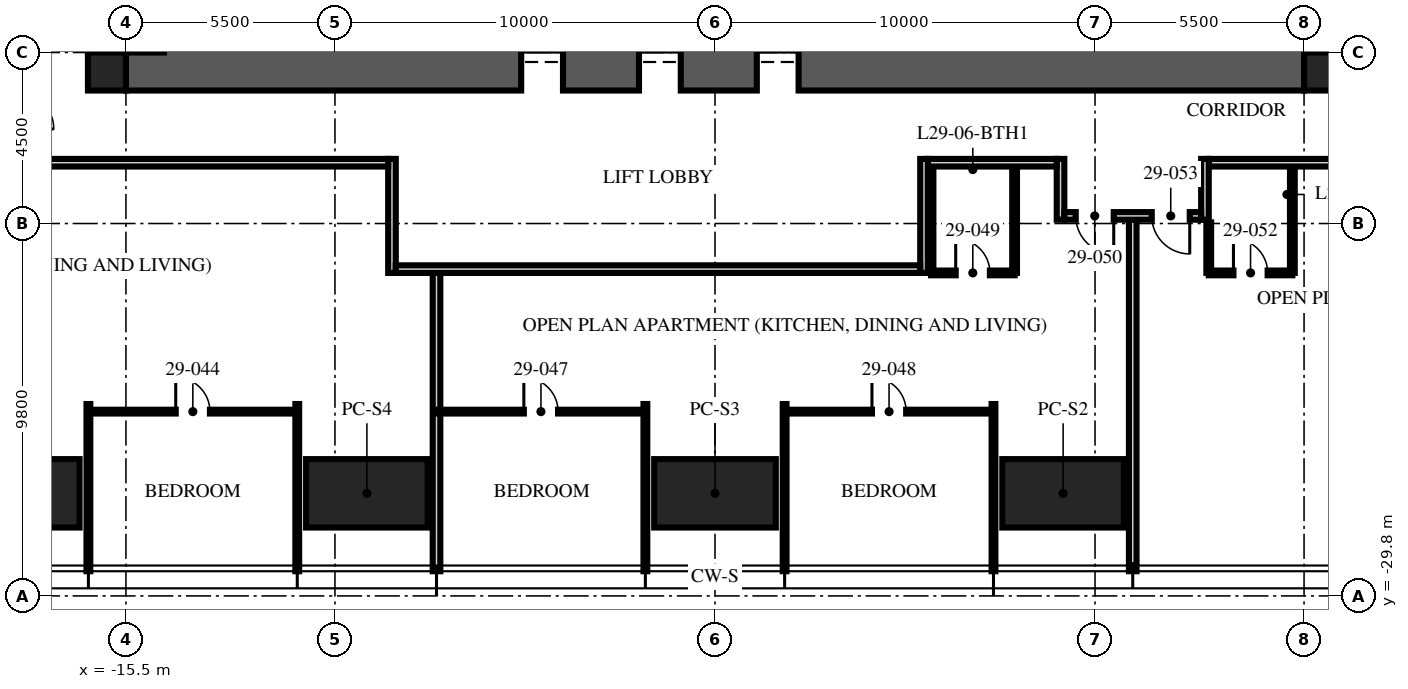
"""IFC4 building model, lengths in metres.
Left out: names, types, materials, properties, quantities, classifications, styles, units other than length and angle.
Written with IfcOpenShell. Run it as: python <this file> out.ifc"""

import sys

from ifc_helpers import new_model, si_unit, direction, frame, frame_2d, origin, origin_2d, place, context, subcontext, project, spatial, rectangle, hollow_rectangle, extrude, element, fill, save


model = new_model("IFC4")
c1 = context("Model", 3, precision=1e-05, world=origin(), true_north=direction((0.0, 1.0)))
c2 = subcontext(c1, "Body", "Model", "MODEL_VIEW")
j1 = project(units=[si_unit("LENGTHUNIT", "METRE"), si_unit("PLANEANGLEUNIT", "RADIAN")], contexts=[c1])
p1 = place(None, origin())
s1 = spatial("IfcSite", under=j1, at=p1, CompositionType="ELEMENT")
p2 = place(p1, origin())
s2 = spatial("IfcBuilding", under=s1, at=p2, CompositionType="ELEMENT")
p3 = place(p2, frame((0.0, 0.0, 118.5)))
s3 = spatial("IfcBuildingStorey", under=s2, at=p3, CompositionType="ELEMENT", Elevation=118.5)
p4 = place(p3, frame((-15.5, -15.5, -0.25), z_axis=(0.0, 0.0, 1.0), x_axis=(1.0, 0.0, 0.0)))
e1 = element("IfcWall", 1, at=p4, inside=s3, PredefinedType="SHEAR", context=c2, shape_type="SweptSolid", body=[
    extrude(rectangle(XDim=31.0, YDim=2.0, at=frame_2d((15.5, 0.0))), origin(), (0.0, 0.0, 1.0), 3.75),
])
p5 = place(p4, frame((10.4, 0.0, 0.25)))
e2 = element("IfcOpeningElement", 2, at=p5, cuts=e1, PredefinedType="OPENING", context=c2, shape_type="SweptSolid", body=[
    extrude(rectangle(XDim=1.1, YDim=2.1, at=frame_2d((0.55, 1.05))), frame((0.0, 1.01, 0.0), z_axis=(0.0, -1.0, 0.0), x_axis=(1.0, 0.0, 0.0)), (0.0, 0.0, 1.0), 2.02),
])
p6 = place(p4, frame((13.5, 0.0, 0.25)))
e3 = element("IfcOpeningElement", 3, at=p6, cuts=e1, PredefinedType="OPENING", context=c2, shape_type="SweptSolid", body=[
    extrude(rectangle(XDim=1.1, YDim=2.1, at=frame_2d((0.55, 1.05))), frame((0.0, 1.01, 0.0), z_axis=(0.0, -1.0, 0.0), x_axis=(1.0, 0.0, 0.0)), (0.0, 0.0, 1.0), 2.02),
])
p7 = place(p4, frame((16.6, 0.0, 0.25)))
e4 = element("IfcOpeningElement", 4, at=p7, cuts=e1, PredefinedType="OPENING", context=c2, shape_type="SweptSolid", body=[
    extrude(rectangle(XDim=1.1, YDim=2.1, at=frame_2d((0.55, 1.05))), frame((0.0, 1.01, 0.0), z_axis=(0.0, -1.0, 0.0), x_axis=(1.0, 0.0, 0.0)), (0.0, 0.0, 1.0), 2.02),
])
for number, where, z_axis, x_axis in (
    (5, (-16.0, -16.0, -0.25), (0.0, 0.0, 1.0), (1.0, 0.0, 0.0)),
    (6, (16.0, -16.0, -0.25), (0.0, 0.0, 1.0), (1.0, 0.0, 0.0)),
):
    element("IfcColumn", number, at=place(p3, frame(where, z_axis=z_axis, x_axis=x_axis)), inside=s3, PredefinedType="COLUMN", context=c2, shape_type="SweptSolid", body=[
        extrude(rectangle(XDim=1.0, YDim=1.0, at=origin_2d()), origin(), (0.0, 0.0, 1.0), 3.75),
    ])
for number, where, z_axis, x_axis in (
    (7, (9.16, -27.1, 0.0), (0.0, 0.0, 1.0), (1.0, 0.0, 0.0)),
    (8, (0.0, -27.1, 0.0), (0.0, 0.0, 1.0), (1.0, 0.0, 0.0)),
    (9, (-9.16, -27.1, 0.0), (0.0, 0.0, 1.0), (1.0, 0.0, 0.0)),
    (10, (-18.32, -27.1, 0.0), (0.0, 0.0, 1.0), (1.0, 0.0, 0.0)),
):
    element("IfcColumn", number, at=place(p3, frame(where, z_axis=z_axis, x_axis=x_axis)), inside=s3, PredefinedType="COLUMN", context=c2, shape_type="SweptSolid", body=[
        extrude(hollow_rectangle(XDim=3.2, YDim=1.8, WallThickness=0.2, at=origin_2d()), origin(), (0.0, 0.0, 1.0), 3.75),
    ])
for number, where, z_axis, x_axis in (
    (11, (-16.488, -24.75, 0.0), (0.0, 0.0, 1.0), (0.0, -1.0, 0.0)),
    (12, (-10.992, -24.75, 0.0), (0.0, 0.0, 1.0), (0.0, -1.0, 0.0)),
):
    element("IfcWall", number, at=place(p3, frame(where, z_axis=z_axis, x_axis=x_axis)), inside=s3, PredefinedType="PARTITIONING", context=c2, shape_type="SweptSolid", body=[
        extrude(rectangle(XDim=4.4, YDim=0.1, at=frame_2d((2.2, 0.0))), origin(), (0.0, 0.0, 1.0), 2.81),
    ])
p8 = place(p3, frame((-7.328, -21.3, 0.0), z_axis=(0.0, 0.0, 1.0), x_axis=(0.0, -1.0, 0.0)))
e13 = element("IfcWall", 13, at=p8, inside=s3, PredefinedType="PARTITIONING", context=c2, shape_type="SweptSolid", body=[
    extrude(rectangle(XDim=7.85, YDim=0.2, at=frame_2d((3.925, 0.0))), origin(), (0.0, 0.0, 1.0), 2.81),
])
for number, where, z_axis, x_axis in (
    (14, (-1.832, -24.75, 0.0), (0.0, 0.0, 1.0), (0.0, -1.0, 0.0)),
    (15, (1.832, -24.75, 0.0), (0.0, 0.0, 1.0), (0.0, -1.0, 0.0)),
    (16, (7.328, -24.75, 0.0), (0.0, 0.0, 1.0), (0.0, -1.0, 0.0)),
):
    element("IfcWall", number, at=place(p3, frame(where, z_axis=z_axis, x_axis=x_axis)), inside=s3, PredefinedType="PARTITIONING", context=c2, shape_type="SweptSolid", body=[
        extrude(rectangle(XDim=4.4, YDim=0.1, at=frame_2d((2.2, 0.0))), origin(), (0.0, 0.0, 1.0), 2.81),
    ])
p9 = place(p3, frame((10.992, -19.9, 0.0), z_axis=(0.0, 0.0, 1.0), x_axis=(0.0, -1.0, 0.0)))
e17 = element("IfcWall", 17, at=p9, inside=s3, PredefinedType="PARTITIONING", context=c2, shape_type="SweptSolid", body=[
    extrude(rectangle(XDim=9.25, YDim=0.2, at=frame_2d((4.625, 0.0))), origin(), (0.0, 0.0, 1.0), 2.81),
])
p10 = place(p3, frame((-16.488, -24.95, 0.0), z_axis=(0.0, 0.0, 1.0), x_axis=(1.0, 0.0, 0.0)))
e18 = element("IfcWall", 18, at=p10, inside=s3, PredefinedType="PARTITIONING", context=c2, shape_type="SweptSolid", body=[
    extrude(rectangle(XDim=5.496, YDim=0.1, at=frame_2d((2.748, 0.0))), origin(), (0.0, 0.0, 1.0), 2.81),
])
p11 = place(p10, frame((2.298, 0.0, 0.0)))
e19 = element("IfcOpeningElement", 19, at=p11, cuts=e18, PredefinedType="OPENING", context=c2, shape_type="SweptSolid", body=[
    extrude(rectangle(XDim=0.9, YDim=2.1, at=frame_2d((0.45, 1.05))), frame((0.0, 0.06, 0.0), z_axis=(0.0, -1.0, 0.0), x_axis=(1.0, 0.0, 0.0)), (0.0, 0.0, 1.0), 0.12),
])
p12 = place(p3, frame((-7.328, -24.95, 0.0), z_axis=(0.0, 0.0, 1.0), x_axis=(1.0, 0.0, 0.0)))
e20 = element("IfcWall", 20, at=p12, inside=s3, PredefinedType="PARTITIONING", context=c2, shape_type="SweptSolid", body=[
    extrude(rectangle(XDim=5.496, YDim=0.1, at=frame_2d((2.748, 0.0))), origin(), (0.0, 0.0, 1.0), 2.81),
])
p13 = place(p12, frame((2.298, 0.0, 0.0)))
e21 = element("IfcOpeningElement", 21, at=p13, cuts=e20, PredefinedType="OPENING", context=c2, shape_type="SweptSolid", body=[
    extrude(rectangle(XDim=0.9, YDim=2.1, at=frame_2d((0.45, 1.05))), frame((0.0, 0.06, 0.0), z_axis=(0.0, -1.0, 0.0), x_axis=(1.0, 0.0, 0.0)), (0.0, 0.0, 1.0), 0.12),
])
p14 = place(p3, frame((1.832, -24.95, 0.0), z_axis=(0.0, 0.0, 1.0), x_axis=(1.0, 0.0, 0.0)))
e22 = element("IfcWall", 22, at=p14, inside=s3, PredefinedType="PARTITIONING", context=c2, shape_type="SweptSolid", body=[
    extrude(rectangle(XDim=5.496, YDim=0.1, at=frame_2d((2.748, 0.0))), origin(), (0.0, 0.0, 1.0), 2.81),
])
p15 = place(p14, frame((2.298, 0.0, 0.0)))
e23 = element("IfcOpeningElement", 23, at=p15, cuts=e22, PredefinedType="OPENING", context=c2, shape_type="SweptSolid", body=[
    extrude(rectangle(XDim=0.9, YDim=2.1, at=frame_2d((0.45, 1.05))), frame((0.0, 0.06, 0.0), z_axis=(0.0, -1.0, 0.0), x_axis=(1.0, 0.0, 0.0)), (0.0, 0.0, 1.0), 0.12),
])
p16 = place(p3, frame((5.684, -21.3, 0.0), z_axis=(0.0, 0.0, 1.0), x_axis=(1.0, 0.0, 0.0)))
e24 = element("IfcWall", 24, at=p16, inside=s3, PredefinedType="PARTITIONING", context=c2, shape_type="SweptSolid", body=[
    extrude(rectangle(XDim=2.2, YDim=0.125, at=frame_2d((1.1, 0.0))), origin(), (0.0, 0.0, 1.0), 3.5),
])
p17 = place(p16, frame((0.65, 0.0, 0.0)))
e25 = element("IfcOpeningElement", 25, at=p17, cuts=e24, PredefinedType="OPENING", context=c2, shape_type="SweptSolid", body=[
    extrude(rectangle(XDim=0.9, YDim=2.1, at=frame_2d((0.45, 1.05))), frame((0.0, 0.073, 0.0), z_axis=(0.0, -1.0, 0.0), x_axis=(1.0, 0.0, 0.0)), (0.0, 0.0, 1.0), 0.145),
])
for number, where, z_axis, x_axis in (
    (26, (5.684, -18.5, 0.0), (0.0, 0.0, 1.0), (0.0, -1.0, 0.0)),
    (27, (7.884, -18.5, 0.0), (0.0, 0.0, 1.0), (0.0, -1.0, 0.0)),
):
    element("IfcWall", number, at=place(p3, frame(where, z_axis=z_axis, x_axis=x_axis)), inside=s3, PredefinedType="PARTITIONING", context=c2, shape_type="SweptSolid", body=[
        extrude(rectangle(XDim=2.8, YDim=0.125, at=frame_2d((1.4, 0.0))), origin(), (0.0, 0.0, 1.0), 3.5),
    ])
p18 = place(p3, frame((12.992, -21.3, 0.0), z_axis=(0.0, 0.0, 1.0), x_axis=(1.0, 0.0, 0.0)))
e28 = element("IfcWall", 28, at=p18, inside=s3, PredefinedType="PARTITIONING", context=c2, shape_type="SweptSolid", body=[
    extrude(rectangle(XDim=2.2, YDim=0.125, at=frame_2d((1.1, 0.0))), origin(), (0.0, 0.0, 1.0), 2.81),
])
p19 = place(p18, frame((0.65, 0.0, 0.0)))
e29 = element("IfcOpeningElement", 29, at=p19, cuts=e28, PredefinedType="OPENING", context=c2, shape_type="SweptSolid", body=[
    extrude(rectangle(XDim=0.9, YDim=2.1, at=frame_2d((0.45, 1.05))), frame((0.0, 0.073, 0.0), z_axis=(0.0, -1.0, 0.0), x_axis=(1.0, 0.0, 0.0)), (0.0, 0.0, 1.0), 0.145),
])
p20 = place(p3, frame((12.992, -19.97, 0.0), z_axis=(0.0, 0.0, 1.0), x_axis=(0.0, -1.0, 0.0)))
e30 = element("IfcWall", 30, at=p20, inside=s3, PredefinedType="PARTITIONING", context=c2, shape_type="SweptSolid", body=[
    extrude(rectangle(XDim=1.33, YDim=0.125, at=frame_2d((0.665, 0.0))), origin(), (0.0, 0.0, 1.0), 3.5),
])
p21 = place(p3, frame((15.192, -18.5, 0.0), z_axis=(0.0, 0.0, 1.0), x_axis=(0.0, -1.0, 0.0)))
e31 = element("IfcWall", 31, at=p21, inside=s3, PredefinedType="PARTITIONING", context=c2, shape_type="SweptSolid", body=[
    extrude(rectangle(XDim=2.8, YDim=0.125, at=frame_2d((1.4, 0.0))), origin(), (0.0, 0.0, 1.0), 3.5),
])
p22 = place(p3, frame((18.5, -18.4, 0.0), z_axis=(0.0, 0.0, 1.0), x_axis=(-1.0, 0.0, 0.0)))
e32 = element("IfcWall", 32, at=p22, inside=s3, PredefinedType="PARTITIONING", context=c2, shape_type="SweptSolid", body=[
    extrude(rectangle(XDim=5.508, YDim=0.2, at=frame_2d((2.754, 0.0))), origin(), (0.0, 0.0, 1.0), 2.3),
])
p23 = place(p3, frame((12.892, -18.3, 0.0), z_axis=(0.0, 0.0, 1.0), x_axis=(0.0, -1.0, 0.0)))
e33 = element("IfcWall", 33, at=p23, inside=s3, PredefinedType="PARTITIONING", context=c2, shape_type="SweptSolid", body=[
    extrude(rectangle(XDim=1.6, YDim=0.2, at=frame_2d((0.8, 0.0))), origin(), (0.0, 0.0, 1.0), 3.5),
])
p24 = place(p3, frame((9.092, -18.3, 0.0), z_axis=(0.0, 0.0, 1.0), x_axis=(0.0, -1.0, 0.0)))
e34 = element("IfcWall", 34, at=p24, inside=s3, PredefinedType="PARTITIONING", context=c2, shape_type="SweptSolid", body=[
    extrude(rectangle(XDim=1.6, YDim=0.2, at=frame_2d((0.8, 0.0))), origin(), (0.0, 0.0, 1.0), 2.7),
])
p25 = place(p3, frame((12.792, -19.8, 0.0), z_axis=(0.0, 0.0, 1.0), x_axis=(-1.0, 0.0, 0.0)))
e35 = element("IfcWall", 35, at=p25, inside=s3, PredefinedType="PARTITIONING", context=c2, shape_type="SweptSolid", body=[
    extrude(rectangle(XDim=3.6, YDim=0.2, at=frame_2d((1.8, 0.0))), origin(), (0.0, 0.0, 1.0), 2.7),
])
p26 = place(p25, frame((2.3, 0.0, 0.0)))
e36 = element("IfcOpeningElement", 36, at=p26, cuts=e35, PredefinedType="OPENING", context=c2, shape_type="SweptSolid", body=[
    extrude(rectangle(XDim=1.0, YDim=2.2, at=frame_2d((0.5, 1.1))), frame((0.0, 0.11, 0.0), z_axis=(0.0, -1.0, 0.0), x_axis=(1.0, 0.0, 0.0)), (0.0, 0.0, 1.0), 0.22),
])
p27 = place(p25, frame((0.3, 0.0, 0.0)))
e37 = element("IfcOpeningElement", 37, at=p27, cuts=e35, PredefinedType="OPENING", context=c2, shape_type="SweptSolid", body=[
    extrude(rectangle(XDim=1.0, YDim=2.2, at=frame_2d((0.5, 1.1))), frame((0.0, 0.11, 0.0), z_axis=(0.0, -1.0, 0.0), x_axis=(1.0, 0.0, 0.0)), (0.0, 0.0, 1.0), 0.22),
])
p28 = place(p3, frame((8.992, -18.4, 0.0), z_axis=(0.0, 0.0, 1.0), x_axis=(-1.0, 0.0, 0.0)))
e38 = element("IfcWall", 38, at=p28, inside=s3, PredefinedType="PARTITIONING", context=c2, shape_type="SweptSolid", body=[
    extrude(rectangle(XDim=3.392, YDim=0.2, at=frame_2d((1.696, 0.0))), origin(), (0.0, 0.0, 1.0), 3.5),
])
for number, where, z_axis, x_axis in (
    (39, (5.5, -18.3, 0.0), (0.0, 0.0, 1.0), (0.0, -1.0, 0.0)),
    (40, (-8.5, -18.3, 0.0), (0.0, 0.0, 1.0), (0.0, -1.0, 0.0)),
):
    element("IfcWall", number, at=place(p3, frame(where, z_axis=z_axis, x_axis=x_axis)), inside=s3, PredefinedType="PARTITIONING", context=c2, shape_type="SweptSolid", body=[
        extrude(rectangle(XDim=3.0, YDim=0.2, at=frame_2d((1.5, 0.0))), origin(), (0.0, 0.0, 1.0), 3.5),
    ])
p29 = place(p3, frame((5.4, -21.2, 0.0), z_axis=(0.0, 0.0, 1.0), x_axis=(-1.0, 0.0, 0.0)))
e41 = element("IfcWall", 41, at=p29, inside=s3, PredefinedType="PARTITIONING", context=c2, shape_type="SweptSolid", body=[
    extrude(rectangle(XDim=13.8, YDim=0.2, at=frame_2d((6.9, 0.0))), origin(), (0.0, 0.0, 1.0), 2.7),
])
p30 = place(p3, frame((-8.6, -18.4, 0.0), z_axis=(0.0, 0.0, 1.0), x_axis=(-1.0, 0.0, 0.0)))
e42 = element("IfcWall", 42, at=p30, inside=s3, PredefinedType="PARTITIONING", context=c2, shape_type="SweptSolid", body=[
    extrude(rectangle(XDim=9.9, YDim=0.2, at=frame_2d((4.95, 0.0))), origin(), (0.0, 0.0, 1.0), 2.3),
])
p31 = place(p5, origin())
e43 = element("IfcDoor", 43, at=p31, inside=s3, OperationType="DOUBLE_DOOR_SLIDING", PredefinedType="DOOR", context=c2, shape_type="SweptSolid", body=[
    extrude(rectangle(XDim=1.1, YDim=2.1, at=frame_2d((0.55, 1.05))), frame((0.0, 0.025, 0.0), z_axis=(0.0, -1.0, 0.0), x_axis=(1.0, 0.0, 0.0)), (0.0, 0.0, 1.0), 0.05),
])
fill(e2, e43)
p32 = place(p6, origin())
e44 = element("IfcDoor", 44, at=p32, inside=s3, OperationType="DOUBLE_DOOR_SLIDING", PredefinedType="DOOR", context=c2, shape_type="SweptSolid", body=[
    extrude(rectangle(XDim=1.1, YDim=2.1, at=frame_2d((0.55, 1.05))), frame((0.0, 0.025, 0.0), z_axis=(0.0, -1.0, 0.0), x_axis=(1.0, 0.0, 0.0)), (0.0, 0.0, 1.0), 0.05),
])
fill(e3, e44)
p33 = place(p7, origin())
e45 = element("IfcDoor", 45, at=p33, inside=s3, OperationType="DOUBLE_DOOR_SLIDING", PredefinedType="DOOR", context=c2, shape_type="SweptSolid", body=[
    extrude(rectangle(XDim=1.1, YDim=2.1, at=frame_2d((0.55, 1.05))), frame((0.0, 0.025, 0.0), z_axis=(0.0, -1.0, 0.0), x_axis=(1.0, 0.0, 0.0)), (0.0, 0.0, 1.0), 0.05),
])
fill(e4, e45)
p34 = place(p11, origin())
e46 = element("IfcDoor", 46, at=p34, inside=s3, OperationType="SINGLE_SWING_LEFT", PredefinedType="DOOR", context=c2, shape_type="SweptSolid", body=[
    extrude(rectangle(XDim=0.9, YDim=2.1, at=frame_2d((0.45, 1.05))), frame((0.0, 0.025, 0.0), z_axis=(0.0, -1.0, 0.0), x_axis=(1.0, 0.0, 0.0)), (0.0, 0.0, 1.0), 0.05),
])
fill(e19, e46)
p35 = place(p13, origin())
e47 = element("IfcDoor", 47, at=p35, inside=s3, OperationType="SINGLE_SWING_LEFT", PredefinedType="DOOR", context=c2, shape_type="SweptSolid", body=[
    extrude(rectangle(XDim=0.9, YDim=2.1, at=frame_2d((0.45, 1.05))), frame((0.0, 0.025, 0.0), z_axis=(0.0, -1.0, 0.0), x_axis=(1.0, 0.0, 0.0)), (0.0, 0.0, 1.0), 0.05),
])
fill(e21, e47)
p36 = place(p15, origin())
e48 = element("IfcDoor", 48, at=p36, inside=s3, OperationType="SINGLE_SWING_LEFT", PredefinedType="DOOR", context=c2, shape_type="SweptSolid", body=[
    extrude(rectangle(XDim=0.9, YDim=2.1, at=frame_2d((0.45, 1.05))), frame((0.0, 0.025, 0.0), z_axis=(0.0, -1.0, 0.0), x_axis=(1.0, 0.0, 0.0)), (0.0, 0.0, 1.0), 0.05),
])
fill(e23, e48)
p37 = place(p17, origin())
e49 = element("IfcDoor", 49, at=p37, inside=s3, OperationType="SINGLE_SWING_LEFT", PredefinedType="DOOR", context=c2, shape_type="SweptSolid", body=[
    extrude(rectangle(XDim=0.9, YDim=2.1, at=frame_2d((0.45, 1.05))), frame((0.0, 0.025, 0.0), z_axis=(0.0, -1.0, 0.0), x_axis=(1.0, 0.0, 0.0)), (0.0, 0.0, 1.0), 0.05),
])
fill(e25, e49)
p38 = place(p26, origin())
e50 = element("IfcDoor", 50, at=p38, inside=s3, OperationType="SINGLE_SWING_LEFT", PredefinedType="DOOR", context=c2, shape_type="SweptSolid", body=[
    extrude(rectangle(XDim=1.0, YDim=2.2, at=frame_2d((0.5, 1.1))), frame((0.0, 0.025, 0.0), z_axis=(0.0, -1.0, 0.0), x_axis=(1.0, 0.0, 0.0)), (0.0, 0.0, 1.0), 0.05),
])
fill(e36, e50)
p39 = place(p19, origin())
e51 = element("IfcDoor", 51, at=p39, inside=s3, OperationType="SINGLE_SWING_LEFT", PredefinedType="DOOR", context=c2, shape_type="SweptSolid", body=[
    extrude(rectangle(XDim=0.9, YDim=2.1, at=frame_2d((0.45, 1.05))), frame((0.0, 0.025, 0.0), z_axis=(0.0, -1.0, 0.0), x_axis=(1.0, 0.0, 0.0)), (0.0, 0.0, 1.0), 0.05),
])
fill(e29, e51)
p40 = place(p27, origin())
e52 = element("IfcDoor", 52, at=p40, inside=s3, OperationType="SINGLE_SWING_LEFT", PredefinedType="DOOR", context=c2, shape_type="SweptSolid", body=[
    extrude(rectangle(XDim=1.0, YDim=2.2, at=frame_2d((0.5, 1.1))), frame((0.0, 0.025, 0.0), z_axis=(0.0, -1.0, 0.0), x_axis=(1.0, 0.0, 0.0)), (0.0, 0.0, 1.0), 0.05),
])
fill(e37, e52)
save(model, sys.argv[1])
